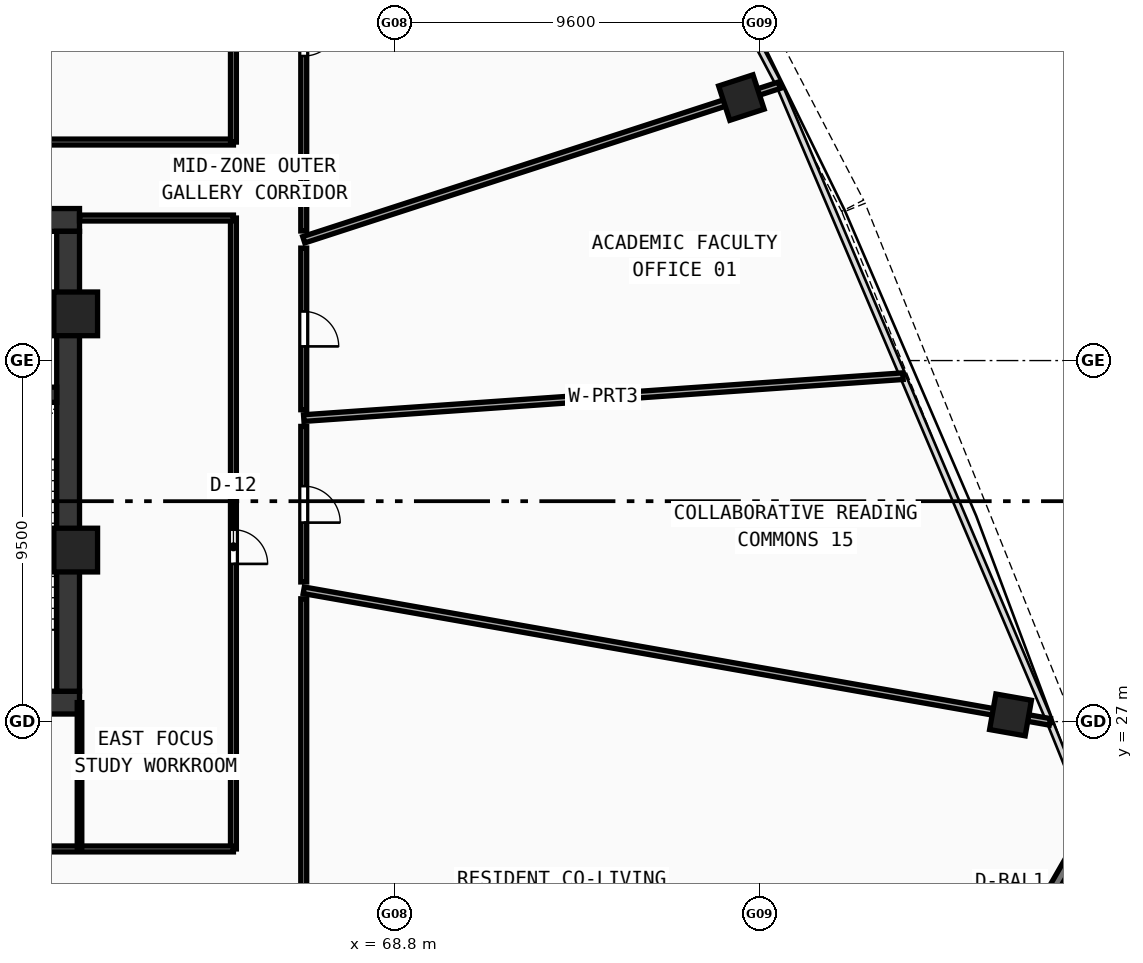
"""IFC4 building model, lengths in metres.
Left out: names, types, materials, properties, quantities, classifications, styles, units other than length and angle.
Written with IfcOpenShell. Run it as: python <this file> out.ifc"""

import sys

from ifc_helpers import new_model, si_unit, direction, frame, frame_2d, origin, origin_with_axes, origin_2d, place, context, subcontext, project, spatial, rectangle, hollow_rectangle, extrude, source, transform, mapped, element, fill, save


model = new_model("IFC4")
c1 = context("Model", 3, precision=1e-05, world=origin(), true_north=direction((0.0, 1.0)))
c2 = subcontext(c1, "Body", "Model", "MODEL_VIEW")
j1 = project(units=[si_unit("LENGTHUNIT", "METRE"), si_unit("PLANEANGLEUNIT", "RADIAN")], contexts=[c1])
p1 = place(None, origin())
s1 = spatial("IfcSite", under=j1, at=p1, CompositionType="ELEMENT")
p2 = place(p1, origin())
s2 = spatial("IfcBuilding", under=s1, at=p2, CompositionType="ELEMENT")
p3 = place(p2, frame((0.0, 0.0, 170.31)))
s3 = spatial("IfcBuildingStorey", under=s2, at=p3, CompositionType="ELEMENT", Elevation=170.31)
p4 = place(p3, frame((35.5, 27.5, 0.0), z_axis=(0.0, 0.0, 1.0), x_axis=(1.0, 0.0, 0.0)))
e1 = element("IfcWall", 1, at=p4, inside=s3, PredefinedType="SHEAR", context=c2, shape_type="SweptSolid", body=[
    extrude(rectangle(XDim=25.0, YDim=0.6, at=frame_2d((12.5, 0.0))), origin(), (0.0, 0.0, 1.0), 5.57),
])
p5 = place(p3, frame((49.2, 40.2, 0.0), z_axis=(0.0, 0.0, 1.0), x_axis=(1.0, 0.0, 0.0)))
e2 = element("IfcWall", 2, at=p5, inside=s3, PredefinedType="SHEAR", context=c2, shape_type="SweptSolid", body=[
    extrude(rectangle(XDim=11.3, YDim=0.6, at=frame_2d((5.65, 0.0))), origin(), (0.0, 0.0, 1.0), 5.57),
])
p6 = place(p5, frame((8.6, 0.0, 0.0)))
e3 = element("IfcOpeningElement", 3, at=p6, cuts=e2, PredefinedType="OPENING", context=c2, shape_type="SweptSolid", body=[
    extrude(rectangle(XDim=1.05, YDim=2.1, at=frame_2d((0.525, 1.05))), frame((0.0, 0.31, 0.0), z_axis=(0.0, -1.0, 0.0), x_axis=(1.0, 0.0, 0.0)), (0.0, 0.0, 1.0), 0.62),
])
p7 = place(p3, frame((60.2, 27.8, 0.0), z_axis=(0.0, 0.0, 1.0), x_axis=(0.0, 1.0, 0.0)))
e4 = element("IfcWall", 4, at=p7, inside=s3, PredefinedType="SHEAR", context=c2, shape_type="SweptSolid", body=[
    extrude(rectangle(XDim=12.1, YDim=0.6, at=frame_2d((6.05, 0.0))), origin(), (0.0, 0.0, 1.0), 5.57),
])
p8 = place(p3, frame((56.8, 35.6, 0.0), z_axis=(0.0, 0.0, 1.0), x_axis=(1.0, 0.0, 0.0)))
e5 = element("IfcWall", 5, at=p8, inside=s3, PredefinedType="SHEAR", context=c2, shape_type="SweptSolid", body=[
    extrude(rectangle(XDim=3.1, YDim=0.4, at=frame_2d((1.55, 0.0))), origin(), (0.0, 0.0, 1.0), 5.57),
])
p9 = place(p8, frame((1.02, 0.0, 0.0)))
e6 = element("IfcOpeningElement", 6, at=p9, cuts=e5, PredefinedType="OPENING", context=c2, shape_type="SweptSolid", body=[
    extrude(rectangle(XDim=1.05, YDim=2.1, at=frame_2d((0.525, 1.05))), frame((0.0, 0.21, 0.0), z_axis=(0.0, -1.0, 0.0), x_axis=(1.0, 0.0, 0.0)), (0.0, 0.0, 1.0), 0.42),
])
m1 = source(origin(), c2, "Body", "SweptSolid", [
    extrude(hollow_rectangle(XDim=1.15, YDim=1.15, WallThickness=0.048, at=origin_2d()), origin(), (0.0, 0.0, 1.0), 5.83),
])
for number, where, z_axis, x_axis in (
    (7, (60.4, 31.513, -0.26), (0.0, 0.0, 1.0), (1.0, 0.0, 0.0)),
    (8, (60.4, 37.729, -0.26), (0.0, 0.0, 1.0), (1.0, 0.0, 0.0)),
):
    element("IfcColumn", number, at=place(p3, frame(where, z_axis=z_axis, x_axis=x_axis)), inside=s3, PredefinedType="COLUMN", context=c2, shape_type="MappedRepresentation", body=[
        mapped(m1, transform((0.0, 0.0, 0.0), scale=1.0)),
    ])
m2 = source(origin(), c2, "Body", "SweptSolid", [
    extrude(hollow_rectangle(XDim=0.95, YDim=0.95, WallThickness=0.04, at=origin_2d()), origin(), (0.0, 0.0, 1.0), 5.83),
])
for number, where, z_axis, x_axis in (
    (9, (84.997, 27.177, -0.26), (0.0, 0.0, 1.0), (0.174, 0.985, 0.0)),
    (10, (77.915, 43.42, -0.26), (0.0, 0.0, 1.0), (-0.309, 0.951, 0.0)),
):
    element("IfcColumn", number, at=place(p3, frame(where, z_axis=z_axis, x_axis=x_axis)), inside=s3, PredefinedType="COLUMN", context=c2, shape_type="MappedRepresentation", body=[
        mapped(m2, transform((0.0, 0.0, 0.0), scale=1.0)),
    ])
p10 = place(p3, frame((82.814, 16.821, 0.0), z_axis=(0.0, 0.0, 1.0), x_axis=(0.497939858886, 0.867211564114, 0.0)))
e11 = element("IfcWall", 11, at=p10, inside=s3, PredefinedType="STANDARD", context=c2, shape_type="SweptSolid", body=[
    extrude(rectangle(XDim=8.696, YDim=0.26, at=frame_2d((4.348, 0.0))), origin(), (0.0, 0.0, 1.0), 5.57),
])
p11 = place(p10, frame((3.448, 0.0, 0.0)))
e12 = element("IfcOpeningElement", 12, at=p11, cuts=e11, PredefinedType="OPENING", context=c2, shape_type="SweptSolid", body=[
    extrude(rectangle(XDim=1.8, YDim=2.15, at=frame_2d((0.9, 1.075))), frame((0.0, 0.14, 0.0), z_axis=(0.0, -1.0, 0.0), x_axis=(1.0, 0.0, 0.0)), (0.0, 0.0, 1.0), 0.28),
])
p12 = place(p3, frame((31.45, 42.25, 0.0), z_axis=(0.0, 0.0, 1.0), x_axis=(1.0, 0.0, 0.0)))
e13 = element("IfcWall", 13, at=p12, inside=s3, PredefinedType="PARTITIONING", context=c2, shape_type="SweptSolid", body=[
    extrude(rectangle(XDim=33.1, YDim=0.155, at=frame_2d((16.55, 0.0))), origin(), (0.0, 0.0, 1.0), 2.22),
])
p13 = place(p3, frame((64.55, 42.25, 0.0), z_axis=(0.0, 0.0, 1.0), x_axis=(0.0, 1.0, 0.0)))
e14 = element("IfcWall", 14, at=p13, inside=s3, PredefinedType="PARTITIONING", context=c2, shape_type="SweptSolid", body=[
    extrude(rectangle(XDim=11.7, YDim=0.155, at=frame_2d((5.85, 0.0))), origin(), (0.0, 0.0, 1.0), 2.22),
])
p14 = place(p3, frame((64.55, 23.65, 0.0), z_axis=(0.0, 0.0, 1.0), x_axis=(0.0, 1.0, 0.0)))
e15 = element("IfcWall", 15, at=p14, inside=s3, PredefinedType="PARTITIONING", context=c2, shape_type="SweptSolid", body=[
    extrude(rectangle(XDim=16.6, YDim=0.155, at=frame_2d((8.3, 0.0))), origin(), (0.0, 0.0, 1.0), 2.22),
])
p15 = place(p14, frame((7.5, 0.0, 0.0)))
e16 = element("IfcOpeningElement", 16, at=p15, cuts=e15, PredefinedType="OPENING", context=c2, shape_type="SweptSolid", body=[
    extrude(rectangle(XDim=0.9, YDim=2.08, at=frame_2d((0.45, 1.04))), frame((0.0, 0.087, 0.0), z_axis=(0.0, -1.0, 0.0), x_axis=(1.0, 0.0, 0.0)), (0.0, 0.0, 1.0), 0.175),
])
p16 = place(p3, frame((31.45, 23.65, 0.0), z_axis=(0.0, 0.0, 1.0), x_axis=(1.0, 0.0, 0.0)))
e17 = element("IfcWall", 17, at=p16, inside=s3, PredefinedType="PARTITIONING", context=c2, shape_type="SweptSolid", body=[
    extrude(rectangle(XDim=33.1, YDim=0.155, at=frame_2d((16.55, 0.0))), origin(), (0.0, 0.0, 1.0), 2.22),
])
p17 = place(p16, frame((16.0, 0.0, 0.0)))
e18 = element("IfcOpeningElement", 18, at=p17, cuts=e17, PredefinedType="OPENING", context=c2, shape_type="SweptSolid", body=[
    extrude(rectangle(XDim=0.92, YDim=2.1, at=frame_2d((0.46, 1.05))), frame((0.0, 0.087, 0.0), z_axis=(0.0, -1.0, 0.0), x_axis=(1.0, 0.0, 0.0)), (0.0, 0.0, 1.0), 0.175),
])
p18 = place(p3, frame((60.5, 40.25, 0.0), z_axis=(0.0, 0.0, 1.0), x_axis=(1.0, 0.0, 0.0)))
e19 = element("IfcWall", 19, at=p18, inside=s3, PredefinedType="PARTITIONING", context=c2, shape_type="SweptSolid", body=[
    extrude(rectangle(XDim=4.05, YDim=0.155, at=frame_2d((2.025, 0.0))), origin(), (0.0, 0.0, 1.0), 5.57),
])
p19 = place(p3, frame((60.5, 23.65, 0.0), z_axis=(0.0, 0.0, 1.0), x_axis=(0.0, 1.0, 0.0)))
e20 = element("IfcWall", 20, at=p19, inside=s3, PredefinedType="PARTITIONING", context=c2, shape_type="SweptSolid", body=[
    extrude(rectangle(XDim=3.85, YDim=0.12, at=frame_2d((1.925, 0.0))), origin(), (0.0, 0.0, 1.0), 5.17),
])
p20 = place(p3, frame((66.4, 34.987, 0.0), z_axis=(0.0, 0.0, 1.0), x_axis=(0.997565064246, 0.069741971556, 0.0)))
e21 = element("IfcWall", 21, at=p20, inside=s3, PredefinedType="PARTITIONING", context=c2, shape_type="SweptSolid", body=[
    extrude(rectangle(XDim=15.805, YDim=0.175, at=frame_2d((7.903, 0.0))), origin(), (0.0, 0.0, 1.0), 4.92),
])
p21 = place(p3, frame((66.4, 39.678, 0.0), z_axis=(0.0, 0.0, 1.0), x_axis=(0.951058745875, 0.309010132349, 0.0)))
e22 = element("IfcWall", 22, at=p21, inside=s3, PredefinedType="PARTITIONING", context=c2, shape_type="SweptSolid", body=[
    extrude(rectangle(XDim=13.158, YDim=0.175, at=frame_2d((6.579, 0.0))), origin(), (0.0, 0.0, 1.0), 2.22),
])
p22 = place(p3, frame((66.4, 30.456, 0.0), z_axis=(0.0, 0.0, 1.0), x_axis=(0.984808700761, -0.173642802629, 0.0)))
e23 = element("IfcWall", 23, at=p22, inside=s3, PredefinedType="PARTITIONING", context=c2, shape_type="SweptSolid", body=[
    extrude(rectangle(XDim=19.934, YDim=0.175, at=frame_2d((9.967, 0.0))), origin(), (0.0, 0.0, 1.0), 2.22),
])
p23 = place(p3, frame((66.4, 50.048, 0.0), z_axis=(0.0, 0.0, 1.0), x_axis=(0.0, -1.0, 0.0)))
e24 = element("IfcWall", 24, at=p23, inside=s3, PredefinedType="PARTITIONING", context=c2, shape_type="SweptSolid", body=[
    extrude(rectangle(XDim=10.138, YDim=0.155, at=frame_2d((5.069, 0.0))), origin(), (0.0, 0.0, 1.0), 2.22),
])
p24 = place(p23, frame((4.615, 0.0, 0.0)))
e25 = element("IfcOpeningElement", 25, at=p24, cuts=e24, PredefinedType="OPENING", context=c2, shape_type="SweptSolid", body=[
    extrude(rectangle(XDim=0.92, YDim=2.1, at=frame_2d((0.46, 1.05))), frame((0.0, 0.087, 0.0), z_axis=(0.0, -1.0, 0.0), x_axis=(1.0, 0.0, 0.0)), (0.0, 0.0, 1.0), 0.175),
])
p25 = place(p3, frame((66.4, 39.459, 0.0), z_axis=(0.0, 0.0, 1.0), x_axis=(0.0, -1.0, 0.0)))
e26 = element("IfcWall", 26, at=p25, inside=s3, PredefinedType="PARTITIONING", context=c2, shape_type="SweptSolid", body=[
    extrude(rectangle(XDim=4.251, YDim=0.155, at=frame_2d((2.126, 0.0))), origin(), (0.0, 0.0, 1.0), 2.22),
])
p26 = place(p25, frame((1.666, 0.0, 0.0)))
e27 = element("IfcOpeningElement", 27, at=p26, cuts=e26, PredefinedType="OPENING", context=c2, shape_type="SweptSolid", body=[
    extrude(rectangle(XDim=0.92, YDim=2.1, at=frame_2d((0.46, 1.05))), frame((0.0, 0.087, 0.0), z_axis=(0.0, -1.0, 0.0), x_axis=(1.0, 0.0, 0.0)), (0.0, 0.0, 1.0), 0.175),
])
p27 = place(p3, frame((66.4, 34.767, 0.0), z_axis=(0.0, 0.0, 1.0), x_axis=(0.0, -1.0, 0.0)))
e28 = element("IfcWall", 28, at=p27, inside=s3, PredefinedType="PARTITIONING", context=c2, shape_type="SweptSolid", body=[
    extrude(rectangle(XDim=4.092, YDim=0.155, at=frame_2d((2.046, 0.0))), origin(), (0.0, 0.0, 1.0), 2.22),
])
p28 = place(p27, frame((1.571, 0.0, 0.0)))
e29 = element("IfcOpeningElement", 29, at=p28, cuts=e28, PredefinedType="OPENING", context=c2, shape_type="SweptSolid", body=[
    extrude(rectangle(XDim=0.96, YDim=2.12, at=frame_2d((0.48, 1.06))), frame((0.0, 0.087, 0.0), z_axis=(0.0, -1.0, 0.0), x_axis=(1.0, 0.0, 0.0)), (0.0, 0.0, 1.0), 0.175),
])
p29 = place(p3, frame((66.4, 30.232, 0.0), z_axis=(0.0, 0.0, 1.0), x_axis=(0.0, -1.0, 0.0)))
e30 = element("IfcWall", 30, at=p29, inside=s3, PredefinedType="PARTITIONING", context=c2, shape_type="SweptSolid", body=[
    extrude(rectangle(XDim=8.432, YDim=0.155, at=frame_2d((4.216, 0.0))), origin(), (0.0, 0.0, 1.0), 2.22),
])
m3 = source(origin(), c2, "Body", "SweptSolid", [
    extrude(rectangle(XDim=0.9, YDim=2.08, at=frame_2d((0.45, 1.04))), frame((0.0, 0.025, 0.0), z_axis=(0.0, -1.0, 0.0), x_axis=(1.0, 0.0, 0.0)), (0.0, 0.0, 1.0), 0.05),
])
p30 = place(p15, frame((0.9, 0.0, 0.0), z_axis=(0.0, 0.0, 1.0), x_axis=(-1.0, 0.0, 0.0)))
e31 = element("IfcDoor", 31, at=p30, inside=s3, OperationType="SINGLE_SWING_RIGHT", PredefinedType="DOOR", context=c2, shape_type="MappedRepresentation", body=[
    mapped(m3, transform((0.0, 0.0, 0.0), scale=1.0)),
])
fill(e16, e31)
m4 = source(origin(), c2, "Body", "SweptSolid", [
    extrude(rectangle(XDim=0.92, YDim=2.1, at=frame_2d((0.46, 1.05))), frame((0.0, 0.025, 0.0), z_axis=(0.0, -1.0, 0.0), x_axis=(1.0, 0.0, 0.0)), (0.0, 0.0, 1.0), 0.05),
])
p31 = place(p26, origin_with_axes())
e32 = element("IfcDoor", 32, at=p31, inside=s3, OperationType="SINGLE_SWING_RIGHT", PredefinedType="DOOR", context=c2, shape_type="MappedRepresentation", body=[
    mapped(m4, transform((0.0, 0.0, 0.0), scale=1.0)),
])
fill(e27, e32)
p32 = place(p24, origin_with_axes())
e33 = element("IfcDoor", 33, at=p32, inside=s3, OperationType="SINGLE_SWING_LEFT", PredefinedType="DOOR", context=c2, shape_type="MappedRepresentation", body=[
    mapped(m4, transform((0.0, 0.0, 0.0), scale=1.0)),
])
fill(e25, e33)
m5 = source(origin(), c2, "Body", "SweptSolid", [
    extrude(rectangle(XDim=0.96, YDim=2.12, at=frame_2d((0.48, 1.06))), frame((0.0, 0.025, 0.0), z_axis=(0.0, -1.0, 0.0), x_axis=(1.0, 0.0, 0.0)), (0.0, 0.0, 1.0), 0.05),
])
p33 = place(p28, origin_with_axes())
e34 = element("IfcDoor", 34, at=p33, inside=s3, OperationType="SINGLE_SWING_RIGHT", PredefinedType="DOOR", context=c2, shape_type="MappedRepresentation", body=[
    mapped(m5, transform((0.0, 0.0, 0.0), scale=1.0)),
])
fill(e29, e34)
save(model, sys.argv[1])
